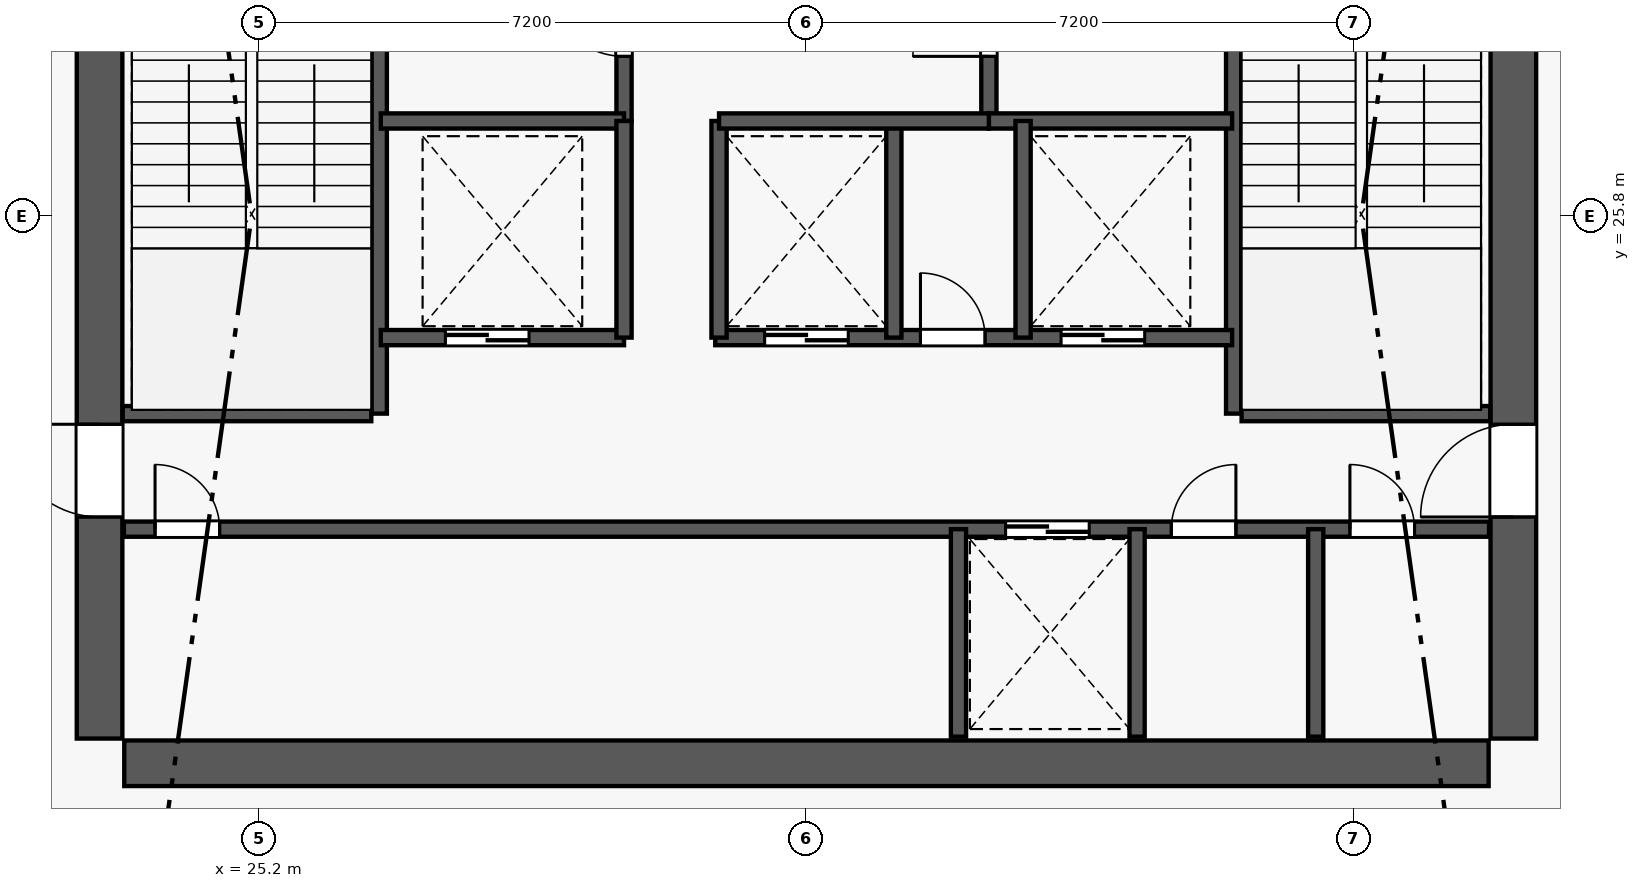
"""IFC4 building model, lengths in metres.
Left out: names, types, materials, properties, quantities, classifications, styles, units other than length and angle.
Written with IfcOpenShell. Run it as: python <this file> out.ifc"""

import sys

from ifc_helpers import new_model, si_unit, direction, frame, frame_2d, origin, origin_2d, place, context, subcontext, project, spatial, rectangle, extrude, element, fill, save


model = new_model("IFC4")
c1 = context("Model", 3, precision=1e-05, world=origin(), true_north=direction((0.0, 1.0)))
c2 = subcontext(c1, "Body", "Model", "MODEL_VIEW")
j1 = project(units=[si_unit("LENGTHUNIT", "METRE"), si_unit("PLANEANGLEUNIT", "RADIAN")], contexts=[c1])
p1 = place(None, origin())
s1 = spatial("IfcSite", under=j1, at=p1, CompositionType="ELEMENT")
p2 = place(p1, origin())
s2 = spatial("IfcBuilding", under=s1, at=p2, CompositionType="ELEMENT")
p3 = place(p2, frame((0.0, 0.0, 167.7)))
s3 = spatial("IfcBuildingStorey", under=s2, at=p3, CompositionType="ELEMENT", Elevation=167.7)
for number, where, z_axis, x_axis in (
    (1, (23.1, 18.6, 0.0), (0.0, 0.0, 1.0), (1.0, 0.0, 0.0)),
    (2, (41.7, 18.6, 0.0), (0.0, 0.0, 1.0), (1.0, 0.0, 0.0)),
):
    element("IfcColumn", number, at=place(p3, frame(where, z_axis=z_axis, x_axis=x_axis)), inside=s3, PredefinedType="COLUMN", context=c2, shape_type="SweptSolid", body=[
        extrude(rectangle(XDim=0.65, YDim=0.65, at=origin_2d()), origin(), (0.0, 0.0, 1.0), 4.2),
    ])
p4 = place(p3, frame((23.425, 18.6, 0.0), z_axis=(0.0, 0.0, 1.0), x_axis=(1.0, 0.0, 0.0)))
e3 = element("IfcWall", 3, at=p4, inside=s3, PredefinedType="SHEAR", context=c2, shape_type="SweptSolid", body=[
    extrude(rectangle(XDim=17.95, YDim=0.6, at=frame_2d((8.975, 0.0))), origin(), (0.0, 0.0, 1.0), 4.0),
])
p5 = place(p3, frame((23.1, 18.925, 0.0), z_axis=(0.0, 0.0, 1.0), x_axis=(0.0, 1.0, 0.0)))
e4 = element("IfcWall", 4, at=p5, inside=s3, PredefinedType="SHEAR", context=c2, shape_type="SweptSolid", body=[
    extrude(rectangle(XDim=13.95, YDim=0.6, at=frame_2d((6.975, 0.0))), origin(), (0.0, 0.0, 1.0), 4.0),
])
p6 = place(p5, frame((2.915, 0.0, 0.0)))
e5 = element("IfcOpeningElement", 5, at=p6, cuts=e4, PredefinedType="OPENING", context=c2, shape_type="SweptSolid", body=[
    extrude(rectangle(XDim=1.22, YDim=2.25, at=frame_2d((0.61, 1.125))), frame((0.0, 0.31, 0.0), z_axis=(0.0, -1.0, 0.0), x_axis=(1.0, 0.0, 0.0)), (0.0, 0.0, 1.0), 0.62),
])
p7 = place(p3, frame((41.7, 18.925, 0.0), z_axis=(0.0, 0.0, 1.0), x_axis=(0.0, 1.0, 0.0)))
e6 = element("IfcWall", 6, at=p7, inside=s3, PredefinedType="SHEAR", context=c2, shape_type="SweptSolid", body=[
    extrude(rectangle(XDim=13.95, YDim=0.6, at=frame_2d((6.975, 0.0))), origin(), (0.0, 0.0, 1.0), 4.0),
])
p8 = place(p7, frame((2.915, 0.0, 0.0)))
e7 = element("IfcOpeningElement", 7, at=p8, cuts=e6, PredefinedType="OPENING", context=c2, shape_type="SweptSolid", body=[
    extrude(rectangle(XDim=1.22, YDim=2.25, at=frame_2d((0.61, 1.125))), frame((0.0, 0.31, 0.0), z_axis=(0.0, -1.0, 0.0), x_axis=(1.0, 0.0, 0.0)), (0.0, 0.0, 1.0), 0.62),
])
p9 = place(p3, frame((26.78, 23.2, 0.0), z_axis=(0.0, 0.0, 1.0), x_axis=(0.0, 1.0, 0.0)))
e8 = element("IfcWall", 8, at=p9, inside=s3, PredefinedType="SHEAR", context=c2, shape_type="SweptSolid", body=[
    extrude(rectangle(XDim=6.78, YDim=0.2, at=frame_2d((3.39, 0.0))), origin(), (0.0, 0.0, 1.0), 4.2),
])
p10 = place(p9, frame((5.32, 0.0, 0.0)))
e9 = element("IfcOpeningElement", 9, at=p10, cuts=e8, PredefinedType="OPENING", context=c2, shape_type="SweptSolid", body=[
    extrude(rectangle(XDim=1.05, YDim=2.15, at=frame_2d((0.525, 1.075))), frame((0.0, 0.11, 0.0), z_axis=(0.0, -1.0, 0.0), x_axis=(1.0, 0.0, 0.0)), (0.0, 0.0, 1.0), 0.22),
])
p11 = place(p3, frame((23.405, 23.2, 0.0), z_axis=(0.0, 0.0, 1.0), x_axis=(1.0, 0.0, 0.0)))
e10 = element("IfcWall", 10, at=p11, inside=s3, PredefinedType="PLUMBINGWALL", context=c2, shape_type="SweptSolid", body=[
    extrude(rectangle(XDim=3.27, YDim=0.2, at=frame_2d((1.635, 0.0))), origin(), (0.0, 0.0, 1.0), 4.0),
])
p12 = place(p3, frame((38.02, 23.2, 0.0), z_axis=(0.0, 0.0, 1.0), x_axis=(0.0, 1.0, 0.0)))
e11 = element("IfcWall", 11, at=p12, inside=s3, PredefinedType="SHEAR", context=c2, shape_type="SweptSolid", body=[
    extrude(rectangle(XDim=6.78, YDim=0.2, at=frame_2d((3.39, 0.0))), origin(), (0.0, 0.0, 1.0), 4.2),
])
p13 = place(p12, frame((5.32, 0.0, 0.0)))
e12 = element("IfcOpeningElement", 12, at=p13, cuts=e11, PredefinedType="OPENING", context=c2, shape_type="SweptSolid", body=[
    extrude(rectangle(XDim=1.05, YDim=2.15, at=frame_2d((0.525, 1.075))), frame((0.0, 0.11, 0.0), z_axis=(0.0, -1.0, 0.0), x_axis=(1.0, 0.0, 0.0)), (0.0, 0.0, 1.0), 0.22),
])
p14 = place(p3, frame((38.125, 23.2, 0.0), z_axis=(0.0, 0.0, 1.0), x_axis=(1.0, 0.0, 0.0)))
e13 = element("IfcWall", 13, at=p14, inside=s3, PredefinedType="PLUMBINGWALL", context=c2, shape_type="SweptSolid", body=[
    extrude(rectangle(XDim=3.27, YDim=0.2, at=frame_2d((1.635, 0.0))), origin(), (0.0, 0.0, 1.0), 4.0),
])
p15 = place(p3, frame((30.0, 27.05, 0.0), z_axis=(0.0, 0.0, 1.0), x_axis=(0.0, 1.0, 0.0)))
e14 = element("IfcWall", 14, at=p15, inside=s3, PredefinedType="PLUMBINGWALL", context=c2, shape_type="SweptSolid", body=[
    extrude(rectangle(XDim=2.75, YDim=0.2, at=frame_2d((1.375, 0.0))), origin(), (0.0, 0.0, 1.0), 4.0),
])
p16 = place(p15, frame((0.85, 0.0, 0.0)))
e15 = element("IfcOpeningElement", 15, at=p16, cuts=e14, PredefinedType="OPENING", context=c2, shape_type="SweptSolid", body=[
    extrude(rectangle(XDim=1.0, YDim=2.15, at=frame_2d((0.5, 1.075))), frame((0.0, 0.11, 0.0), z_axis=(0.0, -1.0, 0.0), x_axis=(1.0, 0.0, 0.0)), (0.0, 0.0, 1.0), 0.22),
])
p17 = place(p3, frame((26.8, 27.05, 0.0), z_axis=(0.0, 0.0, 1.0), x_axis=(1.0, 0.0, 0.0)))
e16 = element("IfcWall", 16, at=p17, inside=s3, PredefinedType="PLUMBINGWALL", context=c2, shape_type="SweptSolid", body=[
    extrude(rectangle(XDim=3.2, YDim=0.2, at=frame_2d((1.6, 0.0))), origin(), (0.0, 0.0, 1.0), 4.0),
])
p18 = place(p3, frame((34.8, 27.05, 0.0), z_axis=(0.0, 0.0, 1.0), x_axis=(0.0, 1.0, 0.0)))
e17 = element("IfcWall", 17, at=p18, inside=s3, PredefinedType="PLUMBINGWALL", context=c2, shape_type="SweptSolid", body=[
    extrude(rectangle(XDim=2.75, YDim=0.2, at=frame_2d((1.375, 0.0))), origin(), (0.0, 0.0, 1.0), 4.0),
])
p19 = place(p18, frame((0.85, 0.0, 0.0)))
e18 = element("IfcOpeningElement", 18, at=p19, cuts=e17, PredefinedType="OPENING", context=c2, shape_type="SweptSolid", body=[
    extrude(rectangle(XDim=1.0, YDim=2.15, at=frame_2d((0.5, 1.075))), frame((0.0, 0.11, 0.0), z_axis=(0.0, -1.0, 0.0), x_axis=(1.0, 0.0, 0.0)), (0.0, 0.0, 1.0), 0.22),
])
p20 = place(p3, frame((34.8, 27.05, 0.0), z_axis=(0.0, 0.0, 1.0), x_axis=(1.0, 0.0, 0.0)))
e19 = element("IfcWall", 19, at=p20, inside=s3, PredefinedType="PLUMBINGWALL", context=c2, shape_type="SweptSolid", body=[
    extrude(rectangle(XDim=3.2, YDim=0.2, at=frame_2d((1.6, 0.0))), origin(), (0.0, 0.0, 1.0), 4.0),
])
p21 = place(p3, frame((26.8, 24.2, 0.0), z_axis=(0.0, 0.0, 1.0), x_axis=(1.0, 0.0, 0.0)))
e20 = element("IfcWall", 20, at=p21, inside=s3, PredefinedType="PLUMBINGWALL", context=c2, shape_type="SweptSolid", body=[
    extrude(rectangle(XDim=3.2, YDim=0.2, at=frame_2d((1.6, 0.0))), origin(), (0.0, 0.0, 1.0), 4.0),
])
p22 = place(p21, frame((0.85, 0.0, 0.0)))
e21 = element("IfcOpeningElement", 21, at=p22, cuts=e20, PredefinedType="OPENING", context=c2, shape_type="SweptSolid", body=[
    extrude(rectangle(XDim=1.1, YDim=2.2, at=frame_2d((0.55, 1.1))), frame((0.0, 0.11, 0.0), z_axis=(0.0, -1.0, 0.0), x_axis=(1.0, 0.0, 0.0)), (0.0, 0.0, 1.0), 0.22),
])
p23 = place(p3, frame((30.0, 24.2, 0.0), z_axis=(0.0, 0.0, 1.0), x_axis=(0.0, 1.0, 0.0)))
e22 = element("IfcWall", 22, at=p23, inside=s3, PredefinedType="PLUMBINGWALL", context=c2, shape_type="SweptSolid", body=[
    extrude(rectangle(XDim=2.85, YDim=0.2, at=frame_2d((1.425, 0.0))), origin(), (0.0, 0.0, 1.0), 4.0),
])
p24 = place(p3, frame((31.2, 24.2, 0.0), z_axis=(0.0, 0.0, 1.0), x_axis=(1.0, 0.0, 0.0)))
e23 = element("IfcWall", 23, at=p24, inside=s3, PredefinedType="PLUMBINGWALL", context=c2, shape_type="SweptSolid", body=[
    extrude(rectangle(XDim=6.8, YDim=0.2, at=frame_2d((3.4, 0.0))), origin(), (0.0, 0.0, 1.0), 4.0),
])
p25 = place(p24, frame((0.65, 0.0, 0.0)))
e24 = element("IfcOpeningElement", 24, at=p25, cuts=e23, PredefinedType="OPENING", context=c2, shape_type="SweptSolid", body=[
    extrude(rectangle(XDim=1.1, YDim=2.2, at=frame_2d((0.55, 1.1))), frame((0.0, 0.11, 0.0), z_axis=(0.0, -1.0, 0.0), x_axis=(1.0, 0.0, 0.0)), (0.0, 0.0, 1.0), 0.22),
])
p26 = place(p24, frame((2.7, 0.0, 0.0)))
e25 = element("IfcOpeningElement", 25, at=p26, cuts=e23, PredefinedType="OPENING", context=c2, shape_type="SweptSolid", body=[
    extrude(rectangle(XDim=0.85, YDim=2.05, at=frame_2d((0.425, 1.025))), frame((0.0, 0.11, 0.0), z_axis=(0.0, -1.0, 0.0), x_axis=(1.0, 0.0, 0.0)), (0.0, 0.0, 1.0), 0.22),
])
p27 = place(p24, frame((4.55, 0.0, 0.0)))
e26 = element("IfcOpeningElement", 26, at=p27, cuts=e23, PredefinedType="OPENING", context=c2, shape_type="SweptSolid", body=[
    extrude(rectangle(XDim=1.1, YDim=2.2, at=frame_2d((0.55, 1.1))), frame((0.0, 0.11, 0.0), z_axis=(0.0, -1.0, 0.0), x_axis=(1.0, 0.0, 0.0)), (0.0, 0.0, 1.0), 0.22),
])
for number, where, z_axis, x_axis in (
    (27, (31.25, 24.2, 0.0), (0.0, 0.0, 1.0), (0.0, 1.0, 0.0)),
    (28, (33.55, 24.2, 0.0), (0.0, 0.0, 1.0), (0.0, 1.0, 0.0)),
    (29, (35.25, 24.2, 0.0), (0.0, 0.0, 1.0), (0.0, 1.0, 0.0)),
):
    element("IfcWall", number, at=place(p3, frame(where, z_axis=z_axis, x_axis=x_axis)), inside=s3, PredefinedType="PLUMBINGWALL", context=c2, shape_type="SweptSolid", body=[
        extrude(rectangle(XDim=2.85, YDim=0.2, at=frame_2d((1.425, 0.0))), origin(), (0.0, 0.0, 1.0), 4.0),
    ])
p28 = place(p3, frame((31.25, 27.05, 0.0), z_axis=(0.0, 0.0, 1.0), x_axis=(1.0, 0.0, 0.0)))
e30 = element("IfcWall", 30, at=p28, inside=s3, PredefinedType="PLUMBINGWALL", context=c2, shape_type="SweptSolid", body=[
    extrude(rectangle(XDim=3.55, YDim=0.2, at=frame_2d((1.775, 0.0))), origin(), (0.0, 0.0, 1.0), 4.0),
])
p29 = place(p3, frame((23.42, 21.68, 0.0), z_axis=(0.0, 0.0, 1.0), x_axis=(1.0, 0.0, 0.0)))
e31 = element("IfcWall", 31, at=p29, inside=s3, PredefinedType="PLUMBINGWALL", context=c2, shape_type="SweptSolid", body=[
    extrude(rectangle(XDim=17.96, YDim=0.2, at=frame_2d((8.98, 0.0))), origin(), (0.0, 0.0, 1.0), 4.0),
])
p30 = place(p29, frame((11.6, 0.0, 0.0)))
e32 = element("IfcOpeningElement", 32, at=p30, cuts=e31, PredefinedType="OPENING", context=c2, shape_type="SweptSolid", body=[
    extrude(rectangle(XDim=1.1, YDim=2.2, at=frame_2d((0.55, 1.1))), frame((0.0, 0.11, 0.0), z_axis=(0.0, -1.0, 0.0), x_axis=(1.0, 0.0, 0.0)), (0.0, 0.0, 1.0), 0.22),
])
p31 = place(p29, frame((0.41, 0.0, 0.0)))
e33 = element("IfcOpeningElement", 33, at=p31, cuts=e31, PredefinedType="OPENING", context=c2, shape_type="SweptSolid", body=[
    extrude(rectangle(XDim=0.85, YDim=2.05, at=frame_2d((0.425, 1.025))), frame((0.0, 0.11, 0.0), z_axis=(0.0, -1.0, 0.0), x_axis=(1.0, 0.0, 0.0)), (0.0, 0.0, 1.0), 0.22),
])
p32 = place(p29, frame((13.78, 0.0, 0.0)))
e34 = element("IfcOpeningElement", 34, at=p32, cuts=e31, PredefinedType="OPENING", context=c2, shape_type="SweptSolid", body=[
    extrude(rectangle(XDim=0.85, YDim=2.05, at=frame_2d((0.425, 1.025))), frame((0.0, 0.11, 0.0), z_axis=(0.0, -1.0, 0.0), x_axis=(1.0, 0.0, 0.0)), (0.0, 0.0, 1.0), 0.22),
])
p33 = place(p29, frame((16.13, 0.0, 0.0)))
e35 = element("IfcOpeningElement", 35, at=p33, cuts=e31, PredefinedType="OPENING", context=c2, shape_type="SweptSolid", body=[
    extrude(rectangle(XDim=0.85, YDim=2.05, at=frame_2d((0.425, 1.025))), frame((0.0, 0.11, 0.0), z_axis=(0.0, -1.0, 0.0), x_axis=(1.0, 0.0, 0.0)), (0.0, 0.0, 1.0), 0.22),
])
for number, where, z_axis, x_axis in (
    (36, (34.4, 18.95, 0.0), (0.0, 0.0, 1.0), (0.0, 1.0, 0.0)),
    (37, (36.75, 18.95, 0.0), (0.0, 0.0, 1.0), (0.0, 1.0, 0.0)),
    (38, (39.1, 18.95, 0.0), (0.0, 0.0, 1.0), (0.0, 1.0, 0.0)),
):
    element("IfcWall", number, at=place(p3, frame(where, z_axis=z_axis, x_axis=x_axis)), inside=s3, PredefinedType="PLUMBINGWALL", context=c2, shape_type="SweptSolid", body=[
        extrude(rectangle(XDim=2.73, YDim=0.2, at=frame_2d((1.365, 0.0))), origin(), (0.0, 0.0, 1.0), 4.0),
    ])
p34 = place(p6, origin())
e39 = element("IfcDoor", 39, at=p34, inside=s3, OperationType="SINGLE_SWING_RIGHT", PredefinedType="DOOR", context=c2, shape_type="SweptSolid", body=[
    extrude(rectangle(XDim=1.22, YDim=2.25, at=frame_2d((0.61, 1.125))), frame((0.0, 0.025, 0.0), z_axis=(0.0, -1.0, 0.0), x_axis=(1.0, 0.0, 0.0)), (0.0, 0.0, 1.0), 0.05),
])
fill(e5, e39)
p35 = place(p8, origin())
e40 = element("IfcDoor", 40, at=p35, inside=s3, OperationType="SINGLE_SWING_LEFT", PredefinedType="DOOR", context=c2, shape_type="SweptSolid", body=[
    extrude(rectangle(XDim=1.22, YDim=2.25, at=frame_2d((0.61, 1.125))), frame((0.0, 0.025, 0.0), z_axis=(0.0, -1.0, 0.0), x_axis=(1.0, 0.0, 0.0)), (0.0, 0.0, 1.0), 0.05),
])
fill(e7, e40)
p36 = place(p16, origin())
e41 = element("IfcDoor", 41, at=p36, inside=s3, OperationType="SINGLE_SWING_RIGHT", PredefinedType="DOOR", context=c2, shape_type="SweptSolid", body=[
    extrude(rectangle(XDim=1.0, YDim=2.15, at=frame_2d((0.5, 1.075))), frame((0.0, 0.025, 0.0), z_axis=(0.0, -1.0, 0.0), x_axis=(1.0, 0.0, 0.0)), (0.0, 0.0, 1.0), 0.05),
])
fill(e15, e41)
p37 = place(p19, origin())
e42 = element("IfcDoor", 42, at=p37, inside=s3, OperationType="SINGLE_SWING_LEFT", PredefinedType="DOOR", context=c2, shape_type="SweptSolid", body=[
    extrude(rectangle(XDim=1.0, YDim=2.15, at=frame_2d((0.5, 1.075))), frame((0.0, 0.025, 0.0), z_axis=(0.0, -1.0, 0.0), x_axis=(1.0, 0.0, 0.0)), (0.0, 0.0, 1.0), 0.05),
])
fill(e18, e42)
p38 = place(p22, origin())
e43 = element("IfcDoor", 43, at=p38, inside=s3, OperationType="DOUBLE_DOOR_SLIDING", PredefinedType="DOOR", context=c2, shape_type="SweptSolid", body=[
    extrude(rectangle(XDim=1.1, YDim=2.2, at=frame_2d((0.55, 1.1))), frame((0.0, 0.025, 0.0), z_axis=(0.0, -1.0, 0.0), x_axis=(1.0, 0.0, 0.0)), (0.0, 0.0, 1.0), 0.05),
])
fill(e21, e43)
p39 = place(p25, origin())
e44 = element("IfcDoor", 44, at=p39, inside=s3, OperationType="DOUBLE_DOOR_SLIDING", PredefinedType="DOOR", context=c2, shape_type="SweptSolid", body=[
    extrude(rectangle(XDim=1.1, YDim=2.2, at=frame_2d((0.55, 1.1))), frame((0.0, 0.025, 0.0), z_axis=(0.0, -1.0, 0.0), x_axis=(1.0, 0.0, 0.0)), (0.0, 0.0, 1.0), 0.05),
])
fill(e24, e44)
p40 = place(p26, origin())
e45 = element("IfcDoor", 45, at=p40, inside=s3, OperationType="SINGLE_SWING_LEFT", PredefinedType="DOOR", context=c2, shape_type="SweptSolid", body=[
    extrude(rectangle(XDim=0.85, YDim=2.05, at=frame_2d((0.425, 1.025))), frame((0.0, 0.025, 0.0), z_axis=(0.0, -1.0, 0.0), x_axis=(1.0, 0.0, 0.0)), (0.0, 0.0, 1.0), 0.05),
])
fill(e25, e45)
p41 = place(p27, origin())
e46 = element("IfcDoor", 46, at=p41, inside=s3, OperationType="DOUBLE_DOOR_SLIDING", PredefinedType="DOOR", context=c2, shape_type="SweptSolid", body=[
    extrude(rectangle(XDim=1.1, YDim=2.2, at=frame_2d((0.55, 1.1))), frame((0.0, 0.025, 0.0), z_axis=(0.0, -1.0, 0.0), x_axis=(1.0, 0.0, 0.0)), (0.0, 0.0, 1.0), 0.05),
])
fill(e26, e46)
p42 = place(p30, origin())
e47 = element("IfcDoor", 47, at=p42, inside=s3, OperationType="DOUBLE_DOOR_SLIDING", PredefinedType="DOOR", context=c2, shape_type="SweptSolid", body=[
    extrude(rectangle(XDim=1.1, YDim=2.2, at=frame_2d((0.55, 1.1))), frame((0.0, 0.025, 0.0), z_axis=(0.0, -1.0, 0.0), x_axis=(1.0, 0.0, 0.0)), (0.0, 0.0, 1.0), 0.05),
])
fill(e32, e47)
p43 = place(p31, origin())
e48 = element("IfcDoor", 48, at=p43, inside=s3, OperationType="SINGLE_SWING_LEFT", PredefinedType="DOOR", context=c2, shape_type="SweptSolid", body=[
    extrude(rectangle(XDim=0.85, YDim=2.05, at=frame_2d((0.425, 1.025))), frame((0.0, 0.025, 0.0), z_axis=(0.0, -1.0, 0.0), x_axis=(1.0, 0.0, 0.0)), (0.0, 0.0, 1.0), 0.05),
])
fill(e33, e48)
p44 = place(p32, origin())
e49 = element("IfcDoor", 49, at=p44, inside=s3, OperationType="SINGLE_SWING_RIGHT", PredefinedType="DOOR", context=c2, shape_type="SweptSolid", body=[
    extrude(rectangle(XDim=0.85, YDim=2.05, at=frame_2d((0.425, 1.025))), frame((0.0, 0.025, 0.0), z_axis=(0.0, -1.0, 0.0), x_axis=(1.0, 0.0, 0.0)), (0.0, 0.0, 1.0), 0.05),
])
fill(e34, e49)
p45 = place(p33, origin())
e50 = element("IfcDoor", 50, at=p45, inside=s3, OperationType="SINGLE_SWING_LEFT", PredefinedType="DOOR", context=c2, shape_type="SweptSolid", body=[
    extrude(rectangle(XDim=0.85, YDim=2.05, at=frame_2d((0.425, 1.025))), frame((0.0, 0.025, 0.0), z_axis=(0.0, -1.0, 0.0), x_axis=(1.0, 0.0, 0.0)), (0.0, 0.0, 1.0), 0.05),
])
fill(e35, e50)
save(model, sys.argv[1])
